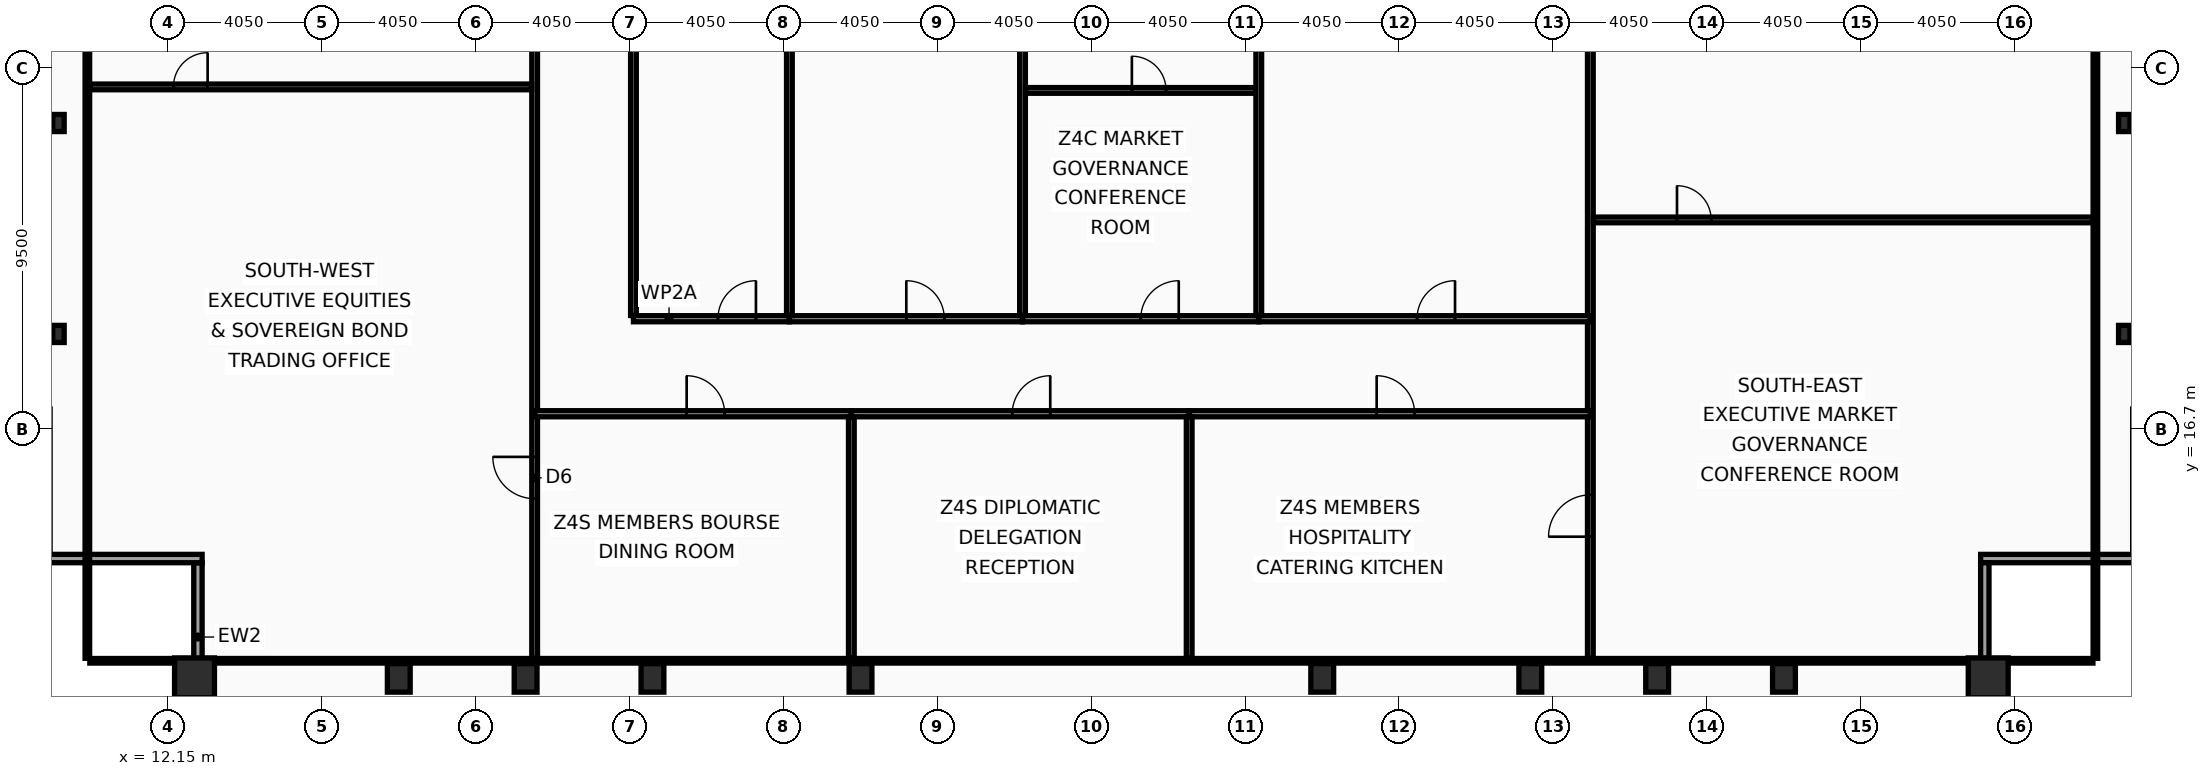
"""IFC4 building model, lengths in metres.
Left out: names, types, materials, properties, quantities, classifications, styles, units other than length and angle.
Written with IfcOpenShell. Run it as: python <this file> out.ifc"""

import sys

from ifc_helpers import new_model, si_unit, direction, frame, frame_2d, origin, origin_2d, place, context, subcontext, project, spatial, rectangle, hollow_rectangle, i_section, extrude, element, fill, save


model = new_model("IFC4")
c1 = context("Model", 3, precision=1e-05, world=origin(), true_north=direction((0.0, 1.0)))
c2 = subcontext(c1, "Body", "Model", "MODEL_VIEW")
j1 = project(units=[si_unit("LENGTHUNIT", "METRE"), si_unit("PLANEANGLEUNIT", "RADIAN")], contexts=[c1])
p1 = place(None, origin())
s1 = spatial("IfcSite", under=j1, at=p1, CompositionType="ELEMENT")
p2 = place(p1, origin())
s2 = spatial("IfcBuilding", under=s1, at=p2, CompositionType="ELEMENT")
p3 = place(p2, frame((0.0, 0.0, 284.2)))
s3 = spatial("IfcBuildingStorey", under=s2, at=p3, CompositionType="ELEMENT", Elevation=284.2)
for number, where, z_axis, x_axis in (
    (1, (12.85, 10.15, 0.0), (0.0, 0.0, 1.0), (1.0, 0.0, 0.0)),
    (2, (60.05, 10.15, 0.0), (0.0, 0.0, 1.0), (1.0, 0.0, 0.0)),
):
    element("IfcColumn", number, at=place(p3, frame(where, z_axis=z_axis, x_axis=x_axis)), inside=s3, PredefinedType="COLUMN", context=c2, shape_type="SweptSolid", body=[
        extrude(hollow_rectangle(XDim=1.05, YDim=1.05, WallThickness=0.055, at=origin_2d()), origin(), (0.0, 0.0, 1.0), 3.6),
    ])
for number, where, z_axis, x_axis in (
    (3, (18.225, 10.15, 0.0), (0.0, 0.0, 1.0), (1.0, 0.0, 0.0)),
    (4, (21.562, 10.15, 0.0), (0.0, 0.0, 1.0), (1.0, 0.0, 0.0)),
    (5, (24.9, 10.15, 0.0), (0.0, 0.0, 1.0), (1.0, 0.0, 0.0)),
    (6, (30.375, 10.15, 0.0), (0.0, 0.0, 1.0), (1.0, 0.0, 0.0)),
    (7, (42.525, 10.15, 0.0), (0.0, 0.0, 1.0), (1.0, 0.0, 0.0)),
    (8, (48.0, 10.15, 0.0), (0.0, 0.0, 1.0), (1.0, 0.0, 0.0)),
    (9, (51.337, 10.15, 0.0), (0.0, 0.0, 1.0), (1.0, 0.0, 0.0)),
    (10, (54.675, 10.15, 0.0), (0.0, 0.0, 1.0), (1.0, 0.0, 0.0)),
):
    element("IfcColumn", number, at=place(p3, frame(where, z_axis=z_axis, x_axis=x_axis)), inside=s3, PredefinedType="COLUMN", context=c2, shape_type="SweptSolid", body=[
        extrude(hollow_rectangle(XDim=0.6, YDim=0.75, WallThickness=0.045, at=origin_2d()), origin(), (0.0, 0.0, 1.0), 3.6),
    ])
for number, where, z_axis, x_axis in (
    (11, (9.27, 19.2, 0.0), (0.0, 0.0, 1.0), (1.0, 0.0, 0.0)),
    (12, (9.27, 24.75, 0.0), (0.0, 0.0, 1.0), (1.0, 0.0, 0.0)),
    (13, (63.63, 19.2, 0.0), (0.0, 0.0, 1.0), (1.0, 0.0, 0.0)),
    (14, (63.63, 24.75, 0.0), (0.0, 0.0, 1.0), (1.0, 0.0, 0.0)),
):
    element("IfcColumn", number, at=place(p3, frame(where, z_axis=z_axis, x_axis=x_axis)), inside=s3, PredefinedType="COLUMN", context=c2, shape_type="SweptSolid", body=[
        extrude(i_section(OverallWidth=0.3, OverallDepth=0.45, WebThickness=0.014, FlangeThickness=0.026, at=origin_2d()), origin(), (0.0, 0.0, 1.0), 3.6),
    ])
p4 = place(p3, frame((12.94, 9.27, 0.0), z_axis=(0.0, 0.0, 1.0), x_axis=(0.0, 1.0, 0.0)))
e15 = element("IfcWall", 15, at=p4, inside=s3, PredefinedType="SOLIDWALL", context=c2, shape_type="SweptSolid", body=[
    extrude(rectangle(XDim=3.91, YDim=0.22, at=frame_2d((1.955, 0.0))), origin(), (0.0, 0.0, 1.0), 2.88),
])
for number, where, z_axis, x_axis in (
    (16, (13.05, 13.29, 0.0), (0.0, 0.0, 1.0), (-1.0, 0.0, 0.0)),
    (17, (64.07, 13.29, 0.0), (0.0, 0.0, 1.0), (-1.0, 0.0, 0.0)),
):
    element("IfcWall", number, at=place(p3, frame(where, z_axis=z_axis, x_axis=x_axis)), inside=s3, PredefinedType="SOLIDWALL", context=c2, shape_type="SweptSolid", body=[
        extrude(rectangle(XDim=4.22, YDim=0.22, at=frame_2d((2.11, 0.0))), origin(), (0.0, 0.0, 1.0), 2.88),
    ])
p5 = place(p3, frame((59.96, 13.18, 0.0), z_axis=(0.0, 0.0, 1.0), x_axis=(0.0, -1.0, 0.0)))
e18 = element("IfcWall", 18, at=p5, inside=s3, PredefinedType="SOLIDWALL", context=c2, shape_type="SweptSolid", body=[
    extrude(rectangle(XDim=3.91, YDim=0.22, at=frame_2d((1.955, 0.0))), origin(), (0.0, 0.0, 1.0), 2.88),
])
p6 = place(p3, frame((21.8, 10.665, 0.0), z_axis=(0.0, 0.0, 1.0), x_axis=(0.0, 1.0, 0.0)))
e19 = element("IfcWall", 19, at=p6, inside=s3, PredefinedType="PARTITIONING", context=c2, shape_type="SweptSolid", body=[
    extrude(rectangle(XDim=24.955, YDim=0.15, at=frame_2d((12.478, 0.0))), origin(), (0.0, 0.0, 1.0), 3.03),
])
p7 = place(p6, frame((4.2, 0.0, 0.0)))
e20 = element("IfcOpeningElement", 20, at=p7, cuts=e19, PredefinedType="OPENING", context=c2, shape_type="SweptSolid", body=[
    extrude(rectangle(XDim=1.1, YDim=2.1, at=frame_2d((0.55, 1.05))), frame((0.0, 0.085, 0.0), z_axis=(0.0, -1.0, 0.0), x_axis=(1.0, 0.0, 0.0)), (0.0, 0.0, 1.0), 0.17),
])
p8 = place(p3, frame((10.095, 25.7, 0.0), z_axis=(0.0, 0.0, 1.0), x_axis=(1.0, 0.0, 0.0)))
e21 = element("IfcWall", 21, at=p8, inside=s3, PredefinedType="PARTITIONING", context=c2, shape_type="SweptSolid", body=[
    extrude(rectangle(XDim=11.625, YDim=0.15, at=frame_2d((5.812, 0.0))), origin(), (0.0, 0.0, 1.0), 2.78),
])
p9 = place(p8, frame((2.2, 0.0, 0.0)))
e22 = element("IfcOpeningElement", 22, at=p9, cuts=e21, PredefinedType="OPENING", context=c2, shape_type="SweptSolid", body=[
    extrude(rectangle(XDim=0.9, YDim=2.05, at=frame_2d((0.45, 1.025))), frame((0.0, 0.085, 0.0), z_axis=(0.0, -1.0, 0.0), x_axis=(1.0, 0.0, 0.0)), (0.0, 0.0, 1.0), 0.17),
])
p10 = place(p3, frame((24.4, 19.685, 0.0), z_axis=(0.0, 0.0, 1.0), x_axis=(0.0, 1.0, 0.0)))
e23 = element("IfcWall", 23, at=p10, inside=s3, PredefinedType="PARTITIONING", context=c2, shape_type="SweptSolid", body=[
    extrude(rectangle(XDim=15.935, YDim=0.15, at=frame_2d((7.968, 0.0))), origin(), (0.0, 0.0, 1.0), 2.78),
])
p11 = place(p3, frame((49.58, 10.665, 0.0), z_axis=(0.0, 0.0, 1.0), x_axis=(0.0, 1.0, 0.0)))
e24 = element("IfcWall", 24, at=p11, inside=s3, PredefinedType="PARTITIONING", context=c2, shape_type="SweptSolid", body=[
    extrude(rectangle(XDim=24.955, YDim=0.15, at=frame_2d((12.478, 0.0))), origin(), (0.0, 0.0, 1.0), 3.03),
])
p12 = place(p11, frame((3.2, 0.0, 0.0)))
e25 = element("IfcOpeningElement", 25, at=p12, cuts=e24, PredefinedType="OPENING", context=c2, shape_type="SweptSolid", body=[
    extrude(rectangle(XDim=1.1, YDim=2.1, at=frame_2d((0.55, 1.05))), frame((0.0, 0.085, 0.0), z_axis=(0.0, -1.0, 0.0), x_axis=(1.0, 0.0, 0.0)), (0.0, 0.0, 1.0), 0.17),
])
p13 = place(p3, frame((49.66, 22.2, 0.0), z_axis=(0.0, 0.0, 1.0), x_axis=(1.0, 0.0, 0.0)))
e26 = element("IfcWall", 26, at=p13, inside=s3, PredefinedType="PARTITIONING", context=c2, shape_type="SweptSolid", body=[
    extrude(rectangle(XDim=13.145, YDim=0.15, at=frame_2d((6.573, 0.0))), origin(), (0.0, 0.0, 1.0), 2.78),
])
p14 = place(p13, frame((2.2, 0.0, 0.0)))
e27 = element("IfcOpeningElement", 27, at=p14, cuts=e26, PredefinedType="OPENING", context=c2, shape_type="SweptSolid", body=[
    extrude(rectangle(XDim=0.9, YDim=2.05, at=frame_2d((0.45, 1.025))), frame((0.0, 0.085, 0.0), z_axis=(0.0, -1.0, 0.0), x_axis=(1.0, 0.0, 0.0)), (0.0, 0.0, 1.0), 0.17),
])
p15 = place(p3, frame((24.4, 19.6, 0.0), z_axis=(0.0, 0.0, 1.0), x_axis=(1.0, 0.0, 0.0)))
e28 = element("IfcWall", 28, at=p15, inside=s3, PredefinedType="PARTITIONING", context=c2, shape_type="SweptSolid", body=[
    extrude(rectangle(XDim=4.104, YDim=0.16, at=frame_2d((2.052, 0.0))), origin(), (0.0, 0.0, 1.0), 2.78),
])
p16 = place(p15, frame((2.223, 0.0, 0.0)))
e29 = element("IfcOpeningElement", 29, at=p16, cuts=e28, PredefinedType="OPENING", context=c2, shape_type="SweptSolid", body=[
    extrude(rectangle(XDim=1.0, YDim=2.05, at=frame_2d((0.5, 1.025))), frame((0.0, 0.09, 0.0), z_axis=(0.0, -1.0, 0.0), x_axis=(1.0, 0.0, 0.0)), (0.0, 0.0, 1.0), 0.18),
])
p17 = place(p3, frame((28.503, 19.6, 0.0), z_axis=(0.0, 0.0, 1.0), x_axis=(1.0, 0.0, 0.0)))
e30 = element("IfcWall", 30, at=p17, inside=s3, PredefinedType="PARTITIONING", context=c2, shape_type="SweptSolid", body=[
    extrude(rectangle(XDim=6.135, YDim=0.16, at=frame_2d((3.067, 0.0))), origin(), (0.0, 0.0, 1.0), 2.78),
])
p18 = place(p17, frame((3.077, 0.0, 0.0)))
e31 = element("IfcOpeningElement", 31, at=p18, cuts=e30, PredefinedType="OPENING", context=c2, shape_type="SweptSolid", body=[
    extrude(rectangle(XDim=1.0, YDim=2.05, at=frame_2d((0.5, 1.025))), frame((0.0, 0.09, 0.0), z_axis=(0.0, -1.0, 0.0), x_axis=(1.0, 0.0, 0.0)), (0.0, 0.0, 1.0), 0.18),
])
p19 = place(p3, frame((28.503, 19.685, 0.0), z_axis=(0.0, 0.0, 1.0), x_axis=(0.0, 1.0, 0.0)))
e32 = element("IfcWall", 32, at=p19, inside=s3, PredefinedType="PARTITIONING", context=c2, shape_type="SweptSolid", body=[
    extrude(rectangle(XDim=15.935, YDim=0.15, at=frame_2d((7.968, 0.0))), origin(), (0.0, 0.0, 1.0), 3.03),
])
p20 = place(p3, frame((34.638, 19.6, 0.0), z_axis=(0.0, 0.0, 1.0), x_axis=(1.0, 0.0, 0.0)))
e33 = element("IfcWall", 33, at=p20, inside=s3, PredefinedType="PARTITIONING", context=c2, shape_type="SweptSolid", body=[
    extrude(rectangle(XDim=6.217, YDim=0.16, at=frame_2d((3.108, 0.0))), origin(), (0.0, 0.0, 1.0), 3.44),
])
p21 = place(p20, frame((3.111, 0.0, 0.0)))
e34 = element("IfcOpeningElement", 34, at=p21, cuts=e33, PredefinedType="OPENING", context=c2, shape_type="SweptSolid", body=[
    extrude(rectangle(XDim=1.0, YDim=2.05, at=frame_2d((0.5, 1.025))), frame((0.0, 0.09, 0.0), z_axis=(0.0, -1.0, 0.0), x_axis=(1.0, 0.0, 0.0)), (0.0, 0.0, 1.0), 0.18),
])
p22 = place(p3, frame((34.638, 19.685, 0.0), z_axis=(0.0, 0.0, 1.0), x_axis=(0.0, 1.0, 0.0)))
e35 = element("IfcWall", 35, at=p22, inside=s3, PredefinedType="PARTITIONING", context=c2, shape_type="SweptSolid", body=[
    extrude(rectangle(XDim=15.935, YDim=0.15, at=frame_2d((7.968, 0.0))), origin(), (0.0, 0.0, 1.0), 3.03),
])
p23 = place(p3, frame((34.718, 25.607, 0.0), z_axis=(0.0, 0.0, 1.0), x_axis=(1.0, 0.0, 0.0)))
e36 = element("IfcWall", 36, at=p23, inside=s3, PredefinedType="PARTITIONING", context=c2, shape_type="SweptSolid", body=[
    extrude(rectangle(XDim=6.057, YDim=0.15, at=frame_2d((3.028, 0.0))), origin(), (0.0, 0.0, 1.0), 3.44),
])
p24 = place(p23, frame((2.798, 0.0, 0.0)))
e37 = element("IfcOpeningElement", 37, at=p24, cuts=e36, PredefinedType="OPENING", context=c2, shape_type="SweptSolid", body=[
    extrude(rectangle(XDim=0.9, YDim=2.05, at=frame_2d((0.45, 1.025))), frame((0.0, 0.085, 0.0), z_axis=(0.0, -1.0, 0.0), x_axis=(1.0, 0.0, 0.0)), (0.0, 0.0, 1.0), 0.17),
])
p25 = place(p3, frame((40.855, 19.6, 0.0), z_axis=(0.0, 0.0, 1.0), x_axis=(1.0, 0.0, 0.0)))
e38 = element("IfcWall", 38, at=p25, inside=s3, PredefinedType="PARTITIONING", context=c2, shape_type="SweptSolid", body=[
    extrude(rectangle(XDim=8.725, YDim=0.16, at=frame_2d((4.363, 0.0))), origin(), (0.0, 0.0, 1.0), 2.78),
])
p26 = place(p25, frame((4.165, 0.0, 0.0)))
e39 = element("IfcOpeningElement", 39, at=p26, cuts=e38, PredefinedType="OPENING", context=c2, shape_type="SweptSolid", body=[
    extrude(rectangle(XDim=1.0, YDim=2.05, at=frame_2d((0.5, 1.025))), frame((0.0, 0.09, 0.0), z_axis=(0.0, -1.0, 0.0), x_axis=(1.0, 0.0, 0.0)), (0.0, 0.0, 1.0), 0.18),
])
p27 = place(p3, frame((40.855, 19.685, 0.0), z_axis=(0.0, 0.0, 1.0), x_axis=(0.0, 1.0, 0.0)))
e40 = element("IfcWall", 40, at=p27, inside=s3, PredefinedType="PARTITIONING", context=c2, shape_type="SweptSolid", body=[
    extrude(rectangle(XDim=15.935, YDim=0.15, at=frame_2d((7.968, 0.0))), origin(), (0.0, 0.0, 1.0), 3.03),
])
p28 = place(p3, frame((21.8, 17.1, 0.0), z_axis=(0.0, 0.0, 1.0), x_axis=(1.0, 0.0, 0.0)))
e41 = element("IfcWall", 41, at=p28, inside=s3, PredefinedType="PARTITIONING", context=c2, shape_type="SweptSolid", body=[
    extrude(rectangle(XDim=8.334, YDim=0.16, at=frame_2d((4.167, 0.0))), origin(), (0.0, 0.0, 1.0), 2.78),
])
p29 = place(p28, frame((4.0, 0.0, 0.0)))
e42 = element("IfcOpeningElement", 42, at=p29, cuts=e41, PredefinedType="OPENING", context=c2, shape_type="SweptSolid", body=[
    extrude(rectangle(XDim=1.0, YDim=2.05, at=frame_2d((0.5, 1.025))), frame((0.0, 0.09, 0.0), z_axis=(0.0, -1.0, 0.0), x_axis=(1.0, 0.0, 0.0)), (0.0, 0.0, 1.0), 0.18),
])
p30 = place(p3, frame((30.134, 17.1, 0.0), z_axis=(0.0, 0.0, 1.0), x_axis=(1.0, 0.0, 0.0)))
e43 = element("IfcWall", 43, at=p30, inside=s3, PredefinedType="PARTITIONING", context=c2, shape_type="SweptSolid", body=[
    extrude(rectangle(XDim=8.89, YDim=0.16, at=frame_2d((4.445, 0.0))), origin(), (0.0, 0.0, 1.0), 2.78),
])
p31 = place(p30, frame((4.234, 0.0, 0.0)))
e44 = element("IfcOpeningElement", 44, at=p31, cuts=e43, PredefinedType="OPENING", context=c2, shape_type="SweptSolid", body=[
    extrude(rectangle(XDim=1.0, YDim=2.05, at=frame_2d((0.5, 1.025))), frame((0.0, 0.09, 0.0), z_axis=(0.0, -1.0, 0.0), x_axis=(1.0, 0.0, 0.0)), (0.0, 0.0, 1.0), 0.18),
])
p32 = place(p3, frame((30.134, 10.665, 0.0), z_axis=(0.0, 0.0, 1.0), x_axis=(0.0, 1.0, 0.0)))
e45 = element("IfcWall", 45, at=p32, inside=s3, PredefinedType="PARTITIONING", context=c2, shape_type="SweptSolid", body=[
    extrude(rectangle(XDim=6.35, YDim=0.15, at=frame_2d((3.175, 0.0))), origin(), (0.0, 0.0, 1.0), 2.78),
])
p33 = place(p3, frame((39.024, 17.1, 0.0), z_axis=(0.0, 0.0, 1.0), x_axis=(1.0, 0.0, 0.0)))
e46 = element("IfcWall", 46, at=p33, inside=s3, PredefinedType="PARTITIONING", context=c2, shape_type="SweptSolid", body=[
    extrude(rectangle(XDim=10.556, YDim=0.16, at=frame_2d((5.278, 0.0))), origin(), (0.0, 0.0, 1.0), 2.78),
])
p34 = place(p33, frame((4.934, 0.0, 0.0)))
e47 = element("IfcOpeningElement", 47, at=p34, cuts=e46, PredefinedType="OPENING", context=c2, shape_type="SweptSolid", body=[
    extrude(rectangle(XDim=1.0, YDim=2.05, at=frame_2d((0.5, 1.025))), frame((0.0, 0.09, 0.0), z_axis=(0.0, -1.0, 0.0), x_axis=(1.0, 0.0, 0.0)), (0.0, 0.0, 1.0), 0.18),
])
p35 = place(p3, frame((39.024, 10.665, 0.0), z_axis=(0.0, 0.0, 1.0), x_axis=(0.0, 1.0, 0.0)))
e48 = element("IfcWall", 48, at=p35, inside=s3, PredefinedType="PARTITIONING", context=c2, shape_type="SweptSolid", body=[
    extrude(rectangle(XDim=6.35, YDim=0.15, at=frame_2d((3.175, 0.0))), origin(), (0.0, 0.0, 1.0), 3.03),
])
for number, where, z_axis, x_axis in (
    (49, (10.03, 10.665, 0.0), (0.0, 0.0, 1.0), (0.0, 1.0, 0.0)),
    (50, (62.87, 10.665, 0.0), (0.0, 0.0, 1.0), (0.0, 1.0, 0.0)),
):
    element("IfcWall", number, at=place(p3, frame(where, z_axis=z_axis, x_axis=x_axis)), inside=s3, PredefinedType="PARTITIONING", context=c2, shape_type="SweptSolid", body=[
        extrude(rectangle(XDim=42.11, YDim=0.12, at=frame_2d((21.055, 0.0))), origin(), (0.0, 0.0, 1.0), 2.78),
    ])
p36 = place(p3, frame((10.095, 10.6, 0.0), z_axis=(0.0, 0.0, 1.0), x_axis=(1.0, 0.0, 0.0)))
e51 = element("IfcWall", 51, at=p36, inside=s3, PredefinedType="PARTITIONING", context=c2, shape_type="SweptSolid", body=[
    extrude(rectangle(XDim=52.71, YDim=0.12, at=frame_2d((26.355, 0.0))), origin(), (0.0, 0.0, 1.0), 2.78),
])
p37 = place(p7, origin())
e52 = element("IfcDoor", 52, at=p37, inside=s3, OperationType="SINGLE_SWING_RIGHT", PredefinedType="DOOR", context=c2, shape_type="SweptSolid", body=[
    extrude(rectangle(XDim=1.1, YDim=2.1, at=frame_2d((0.55, 1.05))), frame((0.0, 0.025, 0.0), z_axis=(0.0, -1.0, 0.0), x_axis=(1.0, 0.0, 0.0)), (0.0, 0.0, 1.0), 0.05),
])
fill(e20, e52)
p38 = place(p9, origin())
e53 = element("IfcDoor", 53, at=p38, inside=s3, OperationType="SINGLE_SWING_RIGHT", PredefinedType="DOOR", context=c2, shape_type="SweptSolid", body=[
    extrude(rectangle(XDim=0.9, YDim=2.05, at=frame_2d((0.45, 1.025))), frame((0.0, 0.025, 0.0), z_axis=(0.0, -1.0, 0.0), x_axis=(1.0, 0.0, 0.0)), (0.0, 0.0, 1.0), 0.05),
])
fill(e22, e53)
p39 = place(p12, origin())
e54 = element("IfcDoor", 54, at=p39, inside=s3, OperationType="SINGLE_SWING_LEFT", PredefinedType="DOOR", context=c2, shape_type="SweptSolid", body=[
    extrude(rectangle(XDim=1.1, YDim=2.1, at=frame_2d((0.55, 1.05))), frame((0.0, 0.025, 0.0), z_axis=(0.0, -1.0, 0.0), x_axis=(1.0, 0.0, 0.0)), (0.0, 0.0, 1.0), 0.05),
])
fill(e25, e54)
p40 = place(p14, origin())
e55 = element("IfcDoor", 55, at=p40, inside=s3, OperationType="SINGLE_SWING_LEFT", PredefinedType="DOOR", context=c2, shape_type="SweptSolid", body=[
    extrude(rectangle(XDim=0.9, YDim=2.05, at=frame_2d((0.45, 1.025))), frame((0.0, 0.025, 0.0), z_axis=(0.0, -1.0, 0.0), x_axis=(1.0, 0.0, 0.0)), (0.0, 0.0, 1.0), 0.05),
])
fill(e27, e55)
p41 = place(p16, origin())
e56 = element("IfcDoor", 56, at=p41, inside=s3, OperationType="SINGLE_SWING_RIGHT", PredefinedType="DOOR", context=c2, shape_type="SweptSolid", body=[
    extrude(rectangle(XDim=1.0, YDim=2.05, at=frame_2d((0.5, 1.025))), frame((0.0, 0.025, 0.0), z_axis=(0.0, -1.0, 0.0), x_axis=(1.0, 0.0, 0.0)), (0.0, 0.0, 1.0), 0.05),
])
fill(e29, e56)
p42 = place(p18, origin())
e57 = element("IfcDoor", 57, at=p42, inside=s3, OperationType="SINGLE_SWING_LEFT", PredefinedType="DOOR", context=c2, shape_type="SweptSolid", body=[
    extrude(rectangle(XDim=1.0, YDim=2.05, at=frame_2d((0.5, 1.025))), frame((0.0, 0.025, 0.0), z_axis=(0.0, -1.0, 0.0), x_axis=(1.0, 0.0, 0.0)), (0.0, 0.0, 1.0), 0.05),
])
fill(e31, e57)
p43 = place(p21, origin())
e58 = element("IfcDoor", 58, at=p43, inside=s3, OperationType="SINGLE_SWING_RIGHT", PredefinedType="DOOR", context=c2, shape_type="SweptSolid", body=[
    extrude(rectangle(XDim=1.0, YDim=2.05, at=frame_2d((0.5, 1.025))), frame((0.0, 0.025, 0.0), z_axis=(0.0, -1.0, 0.0), x_axis=(1.0, 0.0, 0.0)), (0.0, 0.0, 1.0), 0.05),
])
fill(e34, e58)
p44 = place(p24, origin())
e59 = element("IfcDoor", 59, at=p44, inside=s3, OperationType="SINGLE_SWING_LEFT", PredefinedType="DOOR", context=c2, shape_type="SweptSolid", body=[
    extrude(rectangle(XDim=0.9, YDim=2.05, at=frame_2d((0.45, 1.025))), frame((0.0, 0.025, 0.0), z_axis=(0.0, -1.0, 0.0), x_axis=(1.0, 0.0, 0.0)), (0.0, 0.0, 1.0), 0.05),
])
fill(e37, e59)
p45 = place(p26, origin())
e60 = element("IfcDoor", 60, at=p45, inside=s3, OperationType="SINGLE_SWING_RIGHT", PredefinedType="DOOR", context=c2, shape_type="SweptSolid", body=[
    extrude(rectangle(XDim=1.0, YDim=2.05, at=frame_2d((0.5, 1.025))), frame((0.0, 0.025, 0.0), z_axis=(0.0, -1.0, 0.0), x_axis=(1.0, 0.0, 0.0)), (0.0, 0.0, 1.0), 0.05),
])
fill(e39, e60)
p46 = place(p29, origin())
e61 = element("IfcDoor", 61, at=p46, inside=s3, OperationType="SINGLE_SWING_LEFT", PredefinedType="DOOR", context=c2, shape_type="SweptSolid", body=[
    extrude(rectangle(XDim=1.0, YDim=2.05, at=frame_2d((0.5, 1.025))), frame((0.0, 0.025, 0.0), z_axis=(0.0, -1.0, 0.0), x_axis=(1.0, 0.0, 0.0)), (0.0, 0.0, 1.0), 0.05),
])
fill(e42, e61)
p47 = place(p31, origin())
e62 = element("IfcDoor", 62, at=p47, inside=s3, OperationType="SINGLE_SWING_RIGHT", PredefinedType="DOOR", context=c2, shape_type="SweptSolid", body=[
    extrude(rectangle(XDim=1.0, YDim=2.05, at=frame_2d((0.5, 1.025))), frame((0.0, 0.025, 0.0), z_axis=(0.0, -1.0, 0.0), x_axis=(1.0, 0.0, 0.0)), (0.0, 0.0, 1.0), 0.05),
])
fill(e44, e62)
p48 = place(p34, origin())
e63 = element("IfcDoor", 63, at=p48, inside=s3, OperationType="SINGLE_SWING_LEFT", PredefinedType="DOOR", context=c2, shape_type="SweptSolid", body=[
    extrude(rectangle(XDim=1.0, YDim=2.05, at=frame_2d((0.5, 1.025))), frame((0.0, 0.025, 0.0), z_axis=(0.0, -1.0, 0.0), x_axis=(1.0, 0.0, 0.0)), (0.0, 0.0, 1.0), 0.05),
])
fill(e47, e63)
save(model, sys.argv[1])
